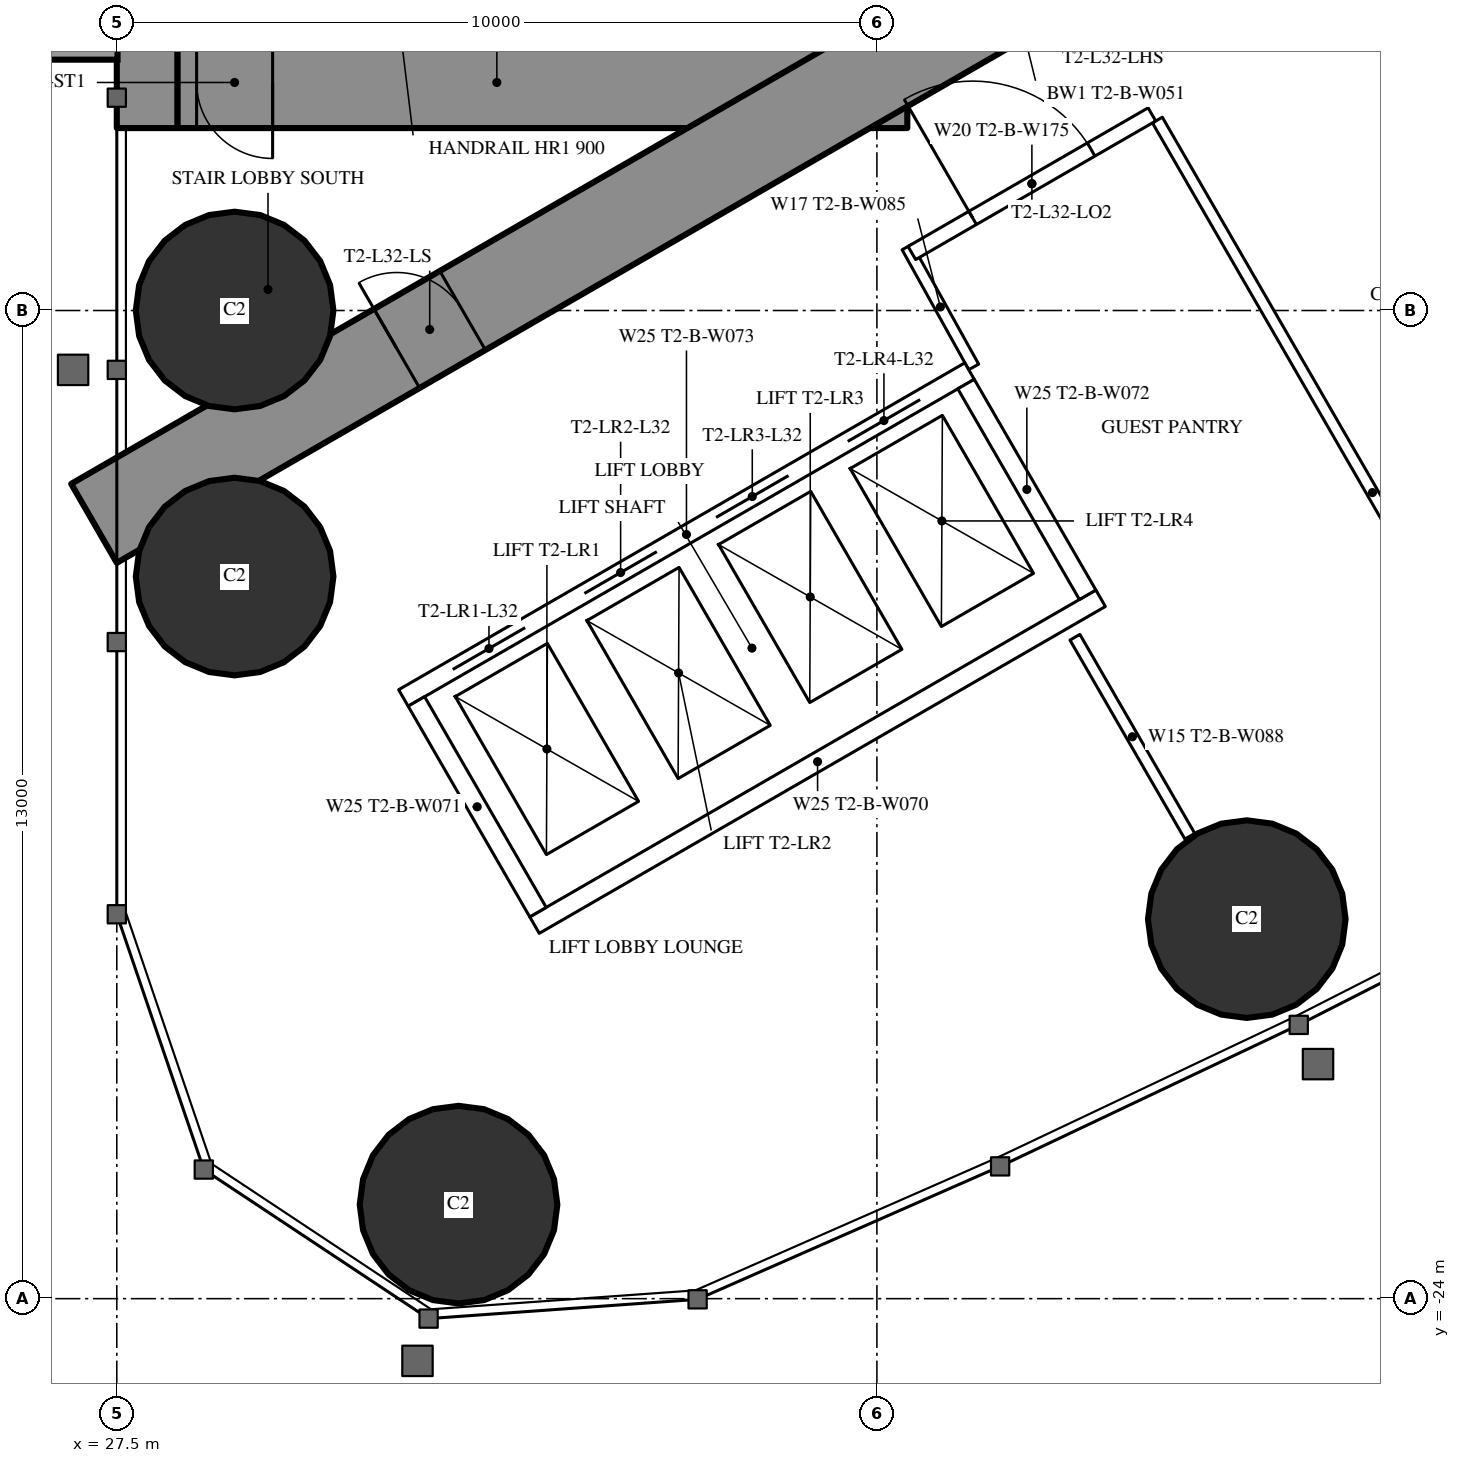
"""IFC4 building model, lengths in metres.
Left out: names, types, materials, properties, quantities, classifications, styles, units other than length and angle.
Written with IfcOpenShell. Run it as: python <this file> out.ifc"""

import sys

from ifc_helpers import new_model, si_unit, direction, frame, frame_2d, origin, origin_2d, place, context, subcontext, project, spatial, rectangle, hollow_circle, extrude, element, fill, save


model = new_model("IFC4")
c1 = context("Model", 3, precision=1e-05, world=origin(), true_north=direction((0.0, 1.0)))
c2 = subcontext(c1, "Body", "Model", "MODEL_VIEW")
j1 = project(units=[si_unit("LENGTHUNIT", "METRE"), si_unit("PLANEANGLEUNIT", "RADIAN")], contexts=[c1])
p1 = place(None, origin())
s1 = spatial("IfcSite", under=j1, at=p1, CompositionType="ELEMENT")
p2 = place(p1, origin())
s2 = spatial("IfcBuilding", under=s1, at=p2, CompositionType="ELEMENT")
p3 = place(p2, frame((0.0, 0.0, 122.1)))
s3 = spatial("IfcBuildingStorey", under=s2, at=p3, CompositionType="ELEMENT", Elevation=122.1)
for number, where, z_axis, x_axis in (
    (1, (31.996, -22.763, 0.0), (0.0, 0.0, 1.0), (1.0, 0.0, 0.0)),
    (2, (29.05, -11.0, 0.0), (0.0, 0.0, 1.0), (1.0, 0.0, 0.0)),
    (3, (29.05, -14.5, 0.0), (0.0, 0.0, 1.0), (1.0, 0.0, 0.0)),
    (4, (42.366, -19.007, 0.0), (0.0, 0.0, 1.0), (1.0, 0.0, 0.0)),
):
    element("IfcColumn", number, at=place(p3, frame(where, z_axis=z_axis, x_axis=x_axis)), inside=s3, PredefinedType="COLUMN", context=c2, shape_type="SweptSolid", body=[
        extrude(hollow_circle(Radius=1.3, WallThickness=0.1, at=origin_2d()), origin(), (0.0, 0.0, 1.0), 3.5),
    ])
p4 = place(p3, frame((27.9, -8.6, 0.0), z_axis=(0.0, 0.0, 1.0), x_axis=(0.0, 1.0, 0.0)))
e5 = element("IfcWall", 5, at=p4, inside=s3, PredefinedType="SHEAR", context=c2, shape_type="SweptSolid", body=[
    extrude(rectangle(XDim=17.2, YDim=0.8, at=frame_2d((8.6, 0.0))), origin(), (0.0, 0.0, 1.0), 3.5),
])
p5 = place(p4, frame((2.45, 0.0, 0.6)))
e6 = element("IfcOpeningElement", 6, at=p5, cuts=e5, PredefinedType="OPENING", context=c2, shape_type="SweptSolid", body=[
    extrude(rectangle(XDim=0.6, YDim=2.1, at=frame_2d((0.3, 1.05))), frame((0.0, 0.41, 0.0), z_axis=(0.0, -1.0, 0.0), x_axis=(1.0, 0.0, 0.0)), (0.0, 0.0, 1.0), 0.82),
])
p6 = place(p4, frame((14.15, 0.0, 0.6)))
e7 = element("IfcOpeningElement", 7, at=p6, cuts=e5, PredefinedType="OPENING", context=c2, shape_type="SweptSolid", body=[
    extrude(rectangle(XDim=0.6, YDim=2.1, at=frame_2d((0.3, 1.05))), frame((0.0, 0.41, 0.0), z_axis=(0.0, -1.0, 0.0), x_axis=(1.0, 0.0, 0.0)), (0.0, 0.0, 1.0), 0.82),
])
p7 = place(p3, frame((37.3, -8.6, 0.0), z_axis=(0.0, 0.0, 1.0), x_axis=(0.0, 1.0, 0.0)))
e8 = element("IfcWall", 8, at=p7, inside=s3, PredefinedType="SHEAR", context=c2, shape_type="SweptSolid", body=[
    extrude(rectangle(XDim=17.2, YDim=1.2, at=frame_2d((8.6, 0.0))), origin(), (0.0, 0.0, 1.0), 3.5),
])
p8 = place(p7, frame((7.7, 0.0, 0.0)))
e9 = element("IfcOpeningElement", 9, at=p8, cuts=e8, PredefinedType="OPENING", context=c2, shape_type="SweptSolid", body=[
    extrude(rectangle(XDim=1.8, YDim=2.2, at=frame_2d((0.9, 1.1))), frame((0.0, 0.61, 0.0), z_axis=(0.0, -1.0, 0.0), x_axis=(1.0, 0.0, 0.0)), (0.0, 0.0, 1.0), 1.22),
])
p9 = place(p3, frame((28.3, -8.0, 0.0), z_axis=(0.0, 0.0, 1.0), x_axis=(1.0, 0.0, 0.0)))
e10 = element("IfcWall", 10, at=p9, inside=s3, PredefinedType="SHEAR", context=c2, shape_type="SweptSolid", body=[
    extrude(rectangle(XDim=8.4, YDim=1.2, at=frame_2d((4.2, 0.0))), origin(), (0.0, 0.0, 1.0), 3.5),
])
p10 = place(p9, frame((0.25, 0.0, 0.0)))
e11 = element("IfcOpeningElement", 11, at=p10, cuts=e10, PredefinedType="OPENING", context=c2, shape_type="SweptSolid", body=[
    extrude(rectangle(XDim=1.0, YDim=2.2, at=frame_2d((0.5, 1.1))), frame((0.0, 0.61, 0.0), z_axis=(0.0, -1.0, 0.0), x_axis=(1.0, 0.0, 0.0)), (0.0, 0.0, 1.0), 1.22),
])
p11 = place(p3, frame((27.2, -13.8, 0.0), z_axis=(0.0, 0.0, 1.0), x_axis=(0.866027159892, 0.499996958321, 0.0)))
e12 = element("IfcWall", 12, at=p11, inside=s3, PredefinedType="SHEAR", context=c2, shape_type="SweptSolid", body=[
    extrude(rectangle(XDim=27.947, YDim=1.2, at=frame_2d((13.973, 0.0))), origin(), (0.0, 0.0, 1.0), 3.5),
])
p12 = place(p11, frame((4.6, 0.0, 0.0)))
e13 = element("IfcOpeningElement", 13, at=p12, cuts=e12, PredefinedType="OPENING", context=c2, shape_type="SweptSolid", body=[
    extrude(rectangle(XDim=1.0, YDim=2.2, at=frame_2d((0.5, 1.1))), frame((0.0, 0.61, 0.0), z_axis=(0.0, -1.0, 0.0), x_axis=(1.0, 0.0, 0.0)), (0.0, 0.0, 1.0), 1.22),
])
p13 = place(p11, frame((13.395, 0.0, 0.0)))
e14 = element("IfcOpeningElement", 14, at=p13, cuts=e12, PredefinedType="OPENING", context=c2, shape_type="SweptSolid", body=[
    extrude(rectangle(XDim=1.8, YDim=2.2, at=frame_2d((0.9, 1.1))), frame((0.0, 0.61, 0.0), z_axis=(0.0, -1.0, 0.0), x_axis=(1.0, 0.0, 0.0)), (0.0, 0.0, 1.0), 1.22),
])
p14 = place(p3, frame((41.19, -8.494, 0.0), z_axis=(0.0, 0.0, 1.0), x_axis=(0.49999258054, -0.866029687369, 0.0)))
e15 = element("IfcWall", 15, at=p14, inside=s3, PredefinedType="PARTITIONING", context=c2, shape_type="SweptSolid", body=[
    extrude(rectangle(XDim=11.318, YDim=0.15, at=frame_2d((5.659, 0.0))), origin(), (0.0, 0.0, 1.0), 3.25),
])
p15 = place(p3, frame((40.105, -15.299, 0.0), z_axis=(0.0, 0.0, 1.0), x_axis=(0.499978822259, -0.866037630414, 0.0)))
e16 = element("IfcWall", 16, at=p15, inside=s3, PredefinedType="PARTITIONING", context=c2, shape_type="SweptSolid", body=[
    extrude(rectangle(XDim=3.023, YDim=0.15, at=frame_2d((1.511, 0.0))), origin(), (0.0, 0.0, 1.0), 3.25),
])
p16 = place(p3, frame((38.773, -11.742, 0.0), z_axis=(0.0, 0.0, 1.0), x_axis=(-0.485528096672, 0.8742210632, 0.0)))
e17 = element("IfcWall", 17, at=p16, inside=s3, PredefinedType="PARTITIONING", context=c2, shape_type="SweptSolid", body=[
    extrude(rectangle(XDim=1.805, YDim=0.15, at=frame_2d((0.903, 0.0))), origin(), (0.0, 0.0, 1.0), 3.25),
])
p17 = place(p3, frame((37.96, -10.243, 0.0), z_axis=(0.0, 0.0, 1.0), x_axis=(0.866042886279, 0.499969718208, 0.0)))
e18 = element("IfcWall", 18, at=p17, inside=s3, PredefinedType="PARTITIONING", context=c2, shape_type="SweptSolid", body=[
    extrude(rectangle(XDim=3.647, YDim=0.2, at=frame_2d((1.823, 0.0))), origin(), (0.0, 0.0, 1.0), 3.25),
])
p18 = place(p17, frame((0.923, 0.0, 0.0)))
e19 = element("IfcOpeningElement", 19, at=p18, cuts=e18, PredefinedType="OPENING", context=c2, shape_type="SweptSolid", body=[
    extrude(rectangle(XDim=1.8, YDim=2.2, at=frame_2d((0.9, 1.1))), frame((0.0, 0.11, 0.0), z_axis=(0.0, -1.0, 0.0), x_axis=(1.0, 0.0, 0.0)), (0.0, 0.0, 1.0), 0.22),
])
p19 = place(p3, frame((31.271, -16.097, 0.0), z_axis=(0.0, 0.0, 1.0), x_axis=(0.86604045752, 0.499973925258, 0.0)))
e20 = element("IfcWall", 20, at=p19, inside=s3, PredefinedType="PARTITIONING", context=c2, shape_type="SweptSolid", body=[
    extrude(rectangle(XDim=8.6, YDim=0.25, at=frame_2d((4.3, 0.0))), origin(), (0.0, 0.0, 1.0), 3.25),
])
p20 = place(p19, frame((0.75, 0.0, 0.0)))
e21 = element("IfcOpeningElement", 21, at=p20, cuts=e20, PredefinedType="OPENING", context=c2, shape_type="SweptSolid", body=[
    extrude(rectangle(XDim=1.1, YDim=2.2, at=frame_2d((0.55, 1.1))), frame((0.0, 0.135, 0.0), z_axis=(0.0, -1.0, 0.0), x_axis=(1.0, 0.0, 0.0)), (0.0, 0.0, 1.0), 0.27),
])
p21 = place(p19, frame((2.75, 0.0, 0.0)))
e22 = element("IfcOpeningElement", 22, at=p21, cuts=e20, PredefinedType="OPENING", context=c2, shape_type="SweptSolid", body=[
    extrude(rectangle(XDim=1.1, YDim=2.2, at=frame_2d((0.55, 1.1))), frame((0.0, 0.135, 0.0), z_axis=(0.0, -1.0, 0.0), x_axis=(1.0, 0.0, 0.0)), (0.0, 0.0, 1.0), 0.27),
])
p22 = place(p19, frame((4.75, 0.0, 0.0)))
e23 = element("IfcOpeningElement", 23, at=p22, cuts=e20, PredefinedType="OPENING", context=c2, shape_type="SweptSolid", body=[
    extrude(rectangle(XDim=1.1, YDim=2.2, at=frame_2d((0.55, 1.1))), frame((0.0, 0.135, 0.0), z_axis=(0.0, -1.0, 0.0), x_axis=(1.0, 0.0, 0.0)), (0.0, 0.0, 1.0), 0.27),
])
p23 = place(p19, frame((6.75, 0.0, 0.0)))
e24 = element("IfcOpeningElement", 24, at=p23, cuts=e20, PredefinedType="OPENING", context=c2, shape_type="SweptSolid", body=[
    extrude(rectangle(XDim=1.1, YDim=2.2, at=frame_2d((0.55, 1.1))), frame((0.0, 0.135, 0.0), z_axis=(0.0, -1.0, 0.0), x_axis=(1.0, 0.0, 0.0)), (0.0, 0.0, 1.0), 0.27),
])
p24 = place(p3, frame((32.996, -19.086, 0.0), z_axis=(0.0, 0.0, 1.0), x_axis=(0.866028165386, 0.499995216735, 0.0)))
e25 = element("IfcWall", 25, at=p24, inside=s3, PredefinedType="PARTITIONING", context=c2, shape_type="SweptSolid", body=[
    extrude(rectangle(XDim=8.6, YDim=0.25, at=frame_2d((4.3, 0.0))), origin(), (0.0, 0.0, 1.0), 3.25),
])
for number, where, z_axis, x_axis in (
    (26, (31.441, -16.143, 0.0), (0.0, 0.0, 1.0), (0.5, -0.866, 0.0)),
    (27, (38.673, -11.968, 0.0), (0.0, 0.0, 1.0), (0.5, -0.866, 0.0)),
):
    element("IfcWall", number, at=place(p3, frame(where, z_axis=z_axis, x_axis=x_axis)), inside=s3, PredefinedType="PARTITIONING", context=c2, shape_type="SweptSolid", body=[
        extrude(rectangle(XDim=3.201, YDim=0.25, at=frame_2d((1.6, 0.0))), origin(), (0.0, 0.0, 1.0), 3.25),
    ])
p25 = place(p18, origin())
e28 = element("IfcDoor", 28, at=p25, inside=s3, OperationType="DOUBLE_DOOR_SINGLE_SWING", PredefinedType="DOOR", context=c2, shape_type="SweptSolid", body=[
    extrude(rectangle(XDim=1.8, YDim=2.2, at=frame_2d((0.9, 1.1))), frame((0.0, 0.025, 0.0), z_axis=(0.0, -1.0, 0.0), x_axis=(1.0, 0.0, 0.0)), (0.0, 0.0, 1.0), 0.05),
])
fill(e19, e28)
p26 = place(p12, origin())
e29 = element("IfcDoor", 29, at=p26, inside=s3, OperationType="SINGLE_SWING_LEFT", PredefinedType="DOOR", context=c2, shape_type="SweptSolid", body=[
    extrude(rectangle(XDim=1.0, YDim=2.2, at=frame_2d((0.5, 1.1))), frame((0.0, 0.025, 0.0), z_axis=(0.0, -1.0, 0.0), x_axis=(1.0, 0.0, 0.0)), (0.0, 0.0, 1.0), 0.05),
])
fill(e13, e29)
p27 = place(p10, origin())
e30 = element("IfcDoor", 30, at=p27, inside=s3, OperationType="SINGLE_SWING_RIGHT", PredefinedType="DOOR", context=c2, shape_type="SweptSolid", body=[
    extrude(rectangle(XDim=1.0, YDim=2.2, at=frame_2d((0.5, 1.1))), frame((0.0, 0.025, 0.0), z_axis=(0.0, -1.0, 0.0), x_axis=(1.0, 0.0, 0.0)), (0.0, 0.0, 1.0), 0.05),
])
fill(e11, e30)
p28 = place(p20, origin())
e31 = element("IfcDoor", 31, at=p28, inside=s3, OperationType="DOUBLE_DOOR_SLIDING", PredefinedType="USERDEFINED", context=c2, shape_type="SweptSolid", body=[
    extrude(rectangle(XDim=1.1, YDim=2.2, at=frame_2d((0.55, 1.1))), frame((0.0, 0.025, 0.0), z_axis=(0.0, -1.0, 0.0), x_axis=(1.0, 0.0, 0.0)), (0.0, 0.0, 1.0), 0.05),
])
fill(e21, e31)
p29 = place(p21, origin())
e32 = element("IfcDoor", 32, at=p29, inside=s3, OperationType="DOUBLE_DOOR_SLIDING", PredefinedType="USERDEFINED", context=c2, shape_type="SweptSolid", body=[
    extrude(rectangle(XDim=1.1, YDim=2.2, at=frame_2d((0.55, 1.1))), frame((0.0, 0.025, 0.0), z_axis=(0.0, -1.0, 0.0), x_axis=(1.0, 0.0, 0.0)), (0.0, 0.0, 1.0), 0.05),
])
fill(e22, e32)
p30 = place(p22, origin())
e33 = element("IfcDoor", 33, at=p30, inside=s3, OperationType="DOUBLE_DOOR_SLIDING", PredefinedType="USERDEFINED", context=c2, shape_type="SweptSolid", body=[
    extrude(rectangle(XDim=1.1, YDim=2.2, at=frame_2d((0.55, 1.1))), frame((0.0, 0.025, 0.0), z_axis=(0.0, -1.0, 0.0), x_axis=(1.0, 0.0, 0.0)), (0.0, 0.0, 1.0), 0.05),
])
fill(e23, e33)
p31 = place(p23, origin())
e34 = element("IfcDoor", 34, at=p31, inside=s3, OperationType="DOUBLE_DOOR_SLIDING", PredefinedType="USERDEFINED", context=c2, shape_type="SweptSolid", body=[
    extrude(rectangle(XDim=1.1, YDim=2.2, at=frame_2d((0.55, 1.1))), frame((0.0, 0.025, 0.0), z_axis=(0.0, -1.0, 0.0), x_axis=(1.0, 0.0, 0.0)), (0.0, 0.0, 1.0), 0.05),
])
fill(e24, e34)
save(model, sys.argv[1])
